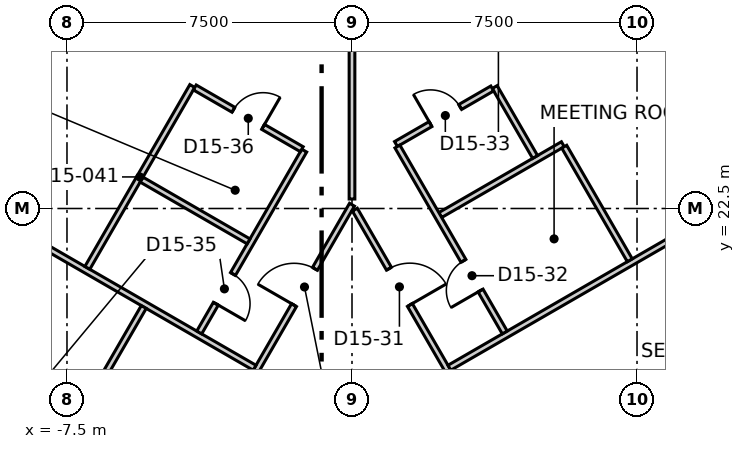
"""IFC4 building model, lengths in metres.
Left out: names, types, materials, properties, quantities, classifications, styles, units other than length and angle.
Written with IfcOpenShell. Run it as: python <this file> out.ifc"""

import sys

from ifc_helpers import new_model, si_unit, direction, frame, frame_2d, origin, place, context, subcontext, project, spatial, rectangle, extrude, element, fill, save


model = new_model("IFC4")
c1 = context("Model", 3, precision=1e-05, world=origin(), true_north=direction((0.0, 1.0)))
c2 = subcontext(c1, "Body", "Model", "MODEL_VIEW")
j1 = project(units=[si_unit("LENGTHUNIT", "METRE"), si_unit("PLANEANGLEUNIT", "RADIAN")], contexts=[c1])
p1 = place(None, origin())
s1 = spatial("IfcSite", under=j1, at=p1, CompositionType="ELEMENT")
p2 = place(p1, origin())
s2 = spatial("IfcBuilding", under=s1, at=p2, CompositionType="ELEMENT")
p3 = place(p2, frame((0.0, 0.0, 71.3)))
s3 = spatial("IfcBuildingStorey", under=s2, at=p3, CompositionType="ELEMENT", Elevation=71.3)
p4 = place(p3, frame((-3.326, 37.084, 0.0), z_axis=(0.0, 0.0, 1.0), x_axis=(-0.500000131003, -0.86602532815, 0.0)))
e1 = element("IfcWall", 1, at=p4, inside=s3, PredefinedType="ELEMENTEDWALL", context=c2, shape_type="SweptSolid", body=[
    extrude(rectangle(XDim=60.886, YDim=0.2, at=frame_2d((30.443, 0.0))), origin(), (0.0, 0.0, 1.0), 3.7),
])
p5 = place(p4, frame((2.146, 0.0, 0.9)))
e2 = element("IfcOpeningElement", 2, at=p5, cuts=e1, PredefinedType="OPENING", context=c2, shape_type="SweptSolid", body=[
    extrude(rectangle(XDim=5.6, YDim=2.5, at=frame_2d((2.8, 1.25))), frame((0.0, 0.11, 0.0), z_axis=(0.0, -1.0, 0.0), x_axis=(1.0, 0.0, 0.0)), (0.0, 0.0, 1.0), 0.22),
])
p6 = place(p4, frame((9.434, 0.0, 0.9)))
e3 = element("IfcOpeningElement", 3, at=p6, cuts=e1, PredefinedType="OPENING", context=c2, shape_type="SweptSolid", body=[
    extrude(rectangle(XDim=5.6, YDim=2.5, at=frame_2d((2.8, 1.25))), frame((0.0, 0.11, 0.0), z_axis=(0.0, -1.0, 0.0), x_axis=(1.0, 0.0, 0.0)), (0.0, 0.0, 1.0), 0.22),
])
p7 = place(p4, frame((16.721, 0.0, 0.9)))
e4 = element("IfcOpeningElement", 4, at=p7, cuts=e1, PredefinedType="OPENING", context=c2, shape_type="SweptSolid", body=[
    extrude(rectangle(XDim=5.6, YDim=2.5, at=frame_2d((2.8, 1.25))), frame((0.0, 0.11, 0.0), z_axis=(0.0, -1.0, 0.0), x_axis=(1.0, 0.0, 0.0)), (0.0, 0.0, 1.0), 0.22),
])
p8 = place(p4, frame((24.009, 0.0, 0.9)))
e5 = element("IfcOpeningElement", 5, at=p8, cuts=e1, PredefinedType="OPENING", context=c2, shape_type="SweptSolid", body=[
    extrude(rectangle(XDim=5.6, YDim=2.5, at=frame_2d((2.8, 1.25))), frame((0.0, 0.11, 0.0), z_axis=(0.0, -1.0, 0.0), x_axis=(1.0, 0.0, 0.0)), (0.0, 0.0, 1.0), 0.22),
])
p9 = place(p4, frame((31.297, 0.0, 0.9)))
e6 = element("IfcOpeningElement", 6, at=p9, cuts=e1, PredefinedType="OPENING", context=c2, shape_type="SweptSolid", body=[
    extrude(rectangle(XDim=5.6, YDim=2.5, at=frame_2d((2.8, 1.25))), frame((0.0, 0.11, 0.0), z_axis=(0.0, -1.0, 0.0), x_axis=(1.0, 0.0, 0.0)), (0.0, 0.0, 1.0), 0.22),
])
p10 = place(p4, frame((38.584, 0.0, 0.9)))
e7 = element("IfcOpeningElement", 7, at=p10, cuts=e1, PredefinedType="OPENING", context=c2, shape_type="SweptSolid", body=[
    extrude(rectangle(XDim=5.6, YDim=2.5, at=frame_2d((2.8, 1.25))), frame((0.0, 0.11, 0.0), z_axis=(0.0, -1.0, 0.0), x_axis=(1.0, 0.0, 0.0)), (0.0, 0.0, 1.0), 0.22),
])
p11 = place(p4, frame((45.872, 0.0, 0.9)))
e8 = element("IfcOpeningElement", 8, at=p11, cuts=e1, PredefinedType="OPENING", context=c2, shape_type="SweptSolid", body=[
    extrude(rectangle(XDim=5.6, YDim=2.5, at=frame_2d((2.8, 1.25))), frame((0.0, 0.11, 0.0), z_axis=(0.0, -1.0, 0.0), x_axis=(1.0, 0.0, 0.0)), (0.0, 0.0, 1.0), 0.22),
])
p12 = place(p4, frame((53.159, 0.0, 0.9)))
e9 = element("IfcOpeningElement", 9, at=p12, cuts=e1, PredefinedType="OPENING", context=c2, shape_type="SweptSolid", body=[
    extrude(rectangle(XDim=5.6, YDim=2.5, at=frame_2d((2.8, 1.25))), frame((0.0, 0.11, 0.0), z_axis=(0.0, -1.0, 0.0), x_axis=(1.0, 0.0, 0.0)), (0.0, 0.0, 1.0), 0.22),
])
p13 = place(p3, frame((33.779, -15.662, 0.0), z_axis=(0.0, 0.0, 1.0), x_axis=(-0.500000131003, 0.86602532815, 0.0)))
e10 = element("IfcWall", 10, at=p13, inside=s3, PredefinedType="ELEMENTEDWALL", context=c2, shape_type="SweptSolid", body=[
    extrude(rectangle(XDim=60.886, YDim=0.2, at=frame_2d((30.443, 0.0))), origin(), (0.0, 0.0, 1.0), 3.7),
])
p14 = place(p13, frame((2.147, 0.0, 0.9)))
e11 = element("IfcOpeningElement", 11, at=p14, cuts=e10, PredefinedType="OPENING", context=c2, shape_type="SweptSolid", body=[
    extrude(rectangle(XDim=5.6, YDim=2.5, at=frame_2d((2.8, 1.25))), frame((0.0, 0.11, 0.0), z_axis=(0.0, -1.0, 0.0), x_axis=(1.0, 0.0, 0.0)), (0.0, 0.0, 1.0), 0.22),
])
p15 = place(p13, frame((9.434, 0.0, 0.9)))
e12 = element("IfcOpeningElement", 12, at=p15, cuts=e10, PredefinedType="OPENING", context=c2, shape_type="SweptSolid", body=[
    extrude(rectangle(XDim=5.6, YDim=2.5, at=frame_2d((2.8, 1.25))), frame((0.0, 0.11, 0.0), z_axis=(0.0, -1.0, 0.0), x_axis=(1.0, 0.0, 0.0)), (0.0, 0.0, 1.0), 0.22),
])
p16 = place(p13, frame((16.722, 0.0, 0.9)))
e13 = element("IfcOpeningElement", 13, at=p16, cuts=e10, PredefinedType="OPENING", context=c2, shape_type="SweptSolid", body=[
    extrude(rectangle(XDim=5.6, YDim=2.5, at=frame_2d((2.8, 1.25))), frame((0.0, 0.11, 0.0), z_axis=(0.0, -1.0, 0.0), x_axis=(1.0, 0.0, 0.0)), (0.0, 0.0, 1.0), 0.22),
])
p17 = place(p13, frame((24.009, 0.0, 0.9)))
e14 = element("IfcOpeningElement", 14, at=p17, cuts=e10, PredefinedType="OPENING", context=c2, shape_type="SweptSolid", body=[
    extrude(rectangle(XDim=5.6, YDim=2.5, at=frame_2d((2.8, 1.25))), frame((0.0, 0.11, 0.0), z_axis=(0.0, -1.0, 0.0), x_axis=(1.0, 0.0, 0.0)), (0.0, 0.0, 1.0), 0.22),
])
p18 = place(p13, frame((31.297, 0.0, 0.9)))
e15 = element("IfcOpeningElement", 15, at=p18, cuts=e10, PredefinedType="OPENING", context=c2, shape_type="SweptSolid", body=[
    extrude(rectangle(XDim=5.6, YDim=2.5, at=frame_2d((2.8, 1.25))), frame((0.0, 0.11, 0.0), z_axis=(0.0, -1.0, 0.0), x_axis=(1.0, 0.0, 0.0)), (0.0, 0.0, 1.0), 0.22),
])
p19 = place(p13, frame((38.584, 0.0, 0.9)))
e16 = element("IfcOpeningElement", 16, at=p19, cuts=e10, PredefinedType="OPENING", context=c2, shape_type="SweptSolid", body=[
    extrude(rectangle(XDim=5.6, YDim=2.5, at=frame_2d((2.8, 1.25))), frame((0.0, 0.11, 0.0), z_axis=(0.0, -1.0, 0.0), x_axis=(1.0, 0.0, 0.0)), (0.0, 0.0, 1.0), 0.22),
])
p20 = place(p13, frame((45.872, 0.0, 0.9)))
e17 = element("IfcOpeningElement", 17, at=p20, cuts=e10, PredefinedType="OPENING", context=c2, shape_type="SweptSolid", body=[
    extrude(rectangle(XDim=5.6, YDim=2.5, at=frame_2d((2.8, 1.25))), frame((0.0, 0.11, 0.0), z_axis=(0.0, -1.0, 0.0), x_axis=(1.0, 0.0, 0.0)), (0.0, 0.0, 1.0), 0.22),
])
p21 = place(p13, frame((53.16, 0.0, 0.9)))
e18 = element("IfcOpeningElement", 18, at=p21, cuts=e10, PredefinedType="OPENING", context=c2, shape_type="SweptSolid", body=[
    extrude(rectangle(XDim=5.6, YDim=2.5, at=frame_2d((2.8, 1.25))), frame((0.0, 0.11, 0.0), z_axis=(0.0, -1.0, 0.0), x_axis=(1.0, 0.0, 0.0)), (0.0, 0.0, 1.0), 0.22),
])
p22 = place(p3, frame((-19.497, -11.17, 0.0), z_axis=(0.0, 0.0, 1.0), x_axis=(0.499998854553, 0.866026065108, 0.0)))
e19 = element("IfcWall", 19, at=p22, inside=s3, PredefinedType="PARTITIONING", context=c2, shape_type="SweptSolid", body=[
    extrude(rectangle(XDim=38.994, YDim=0.15, at=frame_2d((19.497, 0.0))), origin(), (0.0, 0.0, 1.0), 3.7),
])
p23 = place(p22, frame((35.944, 0.0, 0.0)))
e20 = element("IfcOpeningElement", 20, at=p23, cuts=e19, PredefinedType="OPENING", context=c2, shape_type="SweptSolid", body=[
    extrude(rectangle(XDim=1.1, YDim=2.1, at=frame_2d((0.55, 1.05))), frame((0.0, 0.085, 0.0), z_axis=(0.0, -1.0, 0.0), x_axis=(1.0, 0.0, 0.0)), (0.0, 0.0, 1.0), 0.17),
])
p24 = place(p22, frame((26.148, 0.0, 0.0)))
e21 = element("IfcOpeningElement", 21, at=p24, cuts=e19, PredefinedType="OPENING", context=c2, shape_type="SweptSolid", body=[
    extrude(rectangle(XDim=1.1, YDim=2.1, at=frame_2d((0.55, 1.05))), frame((0.0, 0.085, 0.0), z_axis=(0.0, -1.0, 0.0), x_axis=(1.0, 0.0, 0.0)), (0.0, 0.0, 1.0), 0.17),
])
p25 = place(p22, frame((8.572, 0.0, 0.0)))
e22 = element("IfcOpeningElement", 22, at=p25, cuts=e19, PredefinedType="OPENING", context=c2, shape_type="SweptSolid", body=[
    extrude(rectangle(XDim=1.1, YDim=2.1, at=frame_2d((0.55, 1.05))), frame((0.0, 0.085, 0.0), z_axis=(0.0, -1.0, 0.0), x_axis=(1.0, 0.0, 0.0)), (0.0, 0.0, 1.0), 0.17),
])
p26 = place(p22, frame((17.172, 0.0, 0.0)))
e23 = element("IfcOpeningElement", 23, at=p26, cuts=e19, PredefinedType="OPENING", context=c2, shape_type="SweptSolid", body=[
    extrude(rectangle(XDim=0.9, YDim=2.1, at=frame_2d((0.45, 1.05))), frame((0.0, 0.085, 0.0), z_axis=(0.0, -1.0, 0.0), x_axis=(1.0, 0.0, 0.0)), (0.0, 0.0, 1.0), 0.17),
])
p27 = place(p22, frame((14.172, 0.0, 0.0)))
e24 = element("IfcOpeningElement", 24, at=p27, cuts=e19, PredefinedType="OPENING", context=c2, shape_type="SweptSolid", body=[
    extrude(rectangle(XDim=0.9, YDim=2.1, at=frame_2d((0.45, 1.05))), frame((0.0, 0.085, 0.0), z_axis=(0.0, -1.0, 0.0), x_axis=(1.0, 0.0, 0.0)), (0.0, 0.0, 1.0), 0.17),
])
p28 = place(p22, frame((1.797, 0.0, 0.0)))
e25 = element("IfcOpeningElement", 25, at=p28, cuts=e19, PredefinedType="OPENING", context=c2, shape_type="SweptSolid", body=[
    extrude(rectangle(XDim=1.1, YDim=2.1, at=frame_2d((0.55, 1.05))), frame((0.0, 0.085, 0.0), z_axis=(0.0, -1.0, 0.0), x_axis=(1.0, 0.0, 0.0)), (0.0, 0.0, 1.0), 0.17),
])
p29 = place(p3, frame((-11.195, 23.294, 0.0), z_axis=(0.0, 0.0, 1.0), x_axis=(0.866018758693, -0.500011509459, 0.0)))
e26 = element("IfcWall", 26, at=p29, inside=s3, PredefinedType="PARTITIONING", context=c2, shape_type="SweptSolid", body=[
    extrude(rectangle(XDim=9.968, YDim=0.15, at=frame_2d((4.984, 0.0))), origin(), (0.0, 0.0, 1.0), 3.7),
])
p30 = place(p3, frame((0.0, 22.75, 0.0), z_axis=(0.0, 0.0, 1.0), x_axis=(0.0, 1.0, 0.0)))
e27 = element("IfcWall", 27, at=p30, inside=s3, PredefinedType="PARTITIONING", context=c2, shape_type="SweptSolid", body=[
    extrude(rectangle(XDim=7.638, YDim=0.15, at=frame_2d((3.819, 0.0))), origin(), (0.0, 0.0, 1.0), 3.1),
])
p31 = place(p3, frame((0.075, 22.47, 0.0), z_axis=(0.0, 0.0, 1.0), x_axis=(0.500002280369, -0.866024087209, 0.0)))
e28 = element("IfcWall", 28, at=p31, inside=s3, PredefinedType="PARTITIONING", context=c2, shape_type="SweptSolid", body=[
    extrude(rectangle(XDim=38.844, YDim=0.15, at=frame_2d((19.422, 0.0))), origin(), (0.0, 0.0, 1.0), 3.7),
])
p32 = place(p31, frame((35.944, 0.0, 0.0)))
e29 = element("IfcOpeningElement", 29, at=p32, cuts=e28, PredefinedType="OPENING", context=c2, shape_type="SweptSolid", body=[
    extrude(rectangle(XDim=1.1, YDim=2.1, at=frame_2d((0.55, 1.05))), frame((0.0, 0.085, 0.0), z_axis=(0.0, -1.0, 0.0), x_axis=(1.0, 0.0, 0.0)), (0.0, 0.0, 1.0), 0.17),
])
p33 = place(p31, frame((29.848, 0.0, 0.0)))
e30 = element("IfcOpeningElement", 30, at=p33, cuts=e28, PredefinedType="OPENING", context=c2, shape_type="SweptSolid", body=[
    extrude(rectangle(XDim=1.0, YDim=2.1, at=frame_2d((0.5, 1.05))), frame((0.0, 0.085, 0.0), z_axis=(0.0, -1.0, 0.0), x_axis=(1.0, 0.0, 0.0)), (0.0, 0.0, 1.0), 0.17),
])
p34 = place(p31, frame((14.46, 0.0, 0.0)))
e31 = element("IfcOpeningElement", 31, at=p34, cuts=e28, PredefinedType="OPENING", context=c2, shape_type="SweptSolid", body=[
    extrude(rectangle(XDim=1.1, YDim=2.1, at=frame_2d((0.55, 1.05))), frame((0.0, 0.085, 0.0), z_axis=(0.0, -1.0, 0.0), x_axis=(1.0, 0.0, 0.0)), (0.0, 0.0, 1.0), 0.17),
])
p35 = place(p31, frame((24.66, 0.0, 0.0)))
e32 = element("IfcOpeningElement", 32, at=p35, cuts=e28, PredefinedType="OPENING", context=c2, shape_type="SweptSolid", body=[
    extrude(rectangle(XDim=0.9, YDim=2.1, at=frame_2d((0.45, 1.05))), frame((0.0, 0.085, 0.0), z_axis=(0.0, -1.0, 0.0), x_axis=(1.0, 0.0, 0.0)), (0.0, 0.0, 1.0), 0.17),
])
p36 = place(p31, frame((21.46, 0.0, 0.0)))
e33 = element("IfcOpeningElement", 33, at=p36, cuts=e28, PredefinedType="OPENING", context=c2, shape_type="SweptSolid", body=[
    extrude(rectangle(XDim=0.9, YDim=2.1, at=frame_2d((0.45, 1.05))), frame((0.0, 0.085, 0.0), z_axis=(0.0, -1.0, 0.0), x_axis=(1.0, 0.0, 0.0)), (0.0, 0.0, 1.0), 0.17),
])
p37 = place(p31, frame((18.66, 0.0, 0.0)))
e34 = element("IfcOpeningElement", 34, at=p37, cuts=e28, PredefinedType="OPENING", context=c2, shape_type="SweptSolid", body=[
    extrude(rectangle(XDim=1.0, YDim=2.1, at=frame_2d((0.5, 1.05))), frame((0.0, 0.085, 0.0), z_axis=(0.0, -1.0, 0.0), x_axis=(1.0, 0.0, 0.0)), (0.0, 0.0, 1.0), 0.17),
])
p38 = place(p31, frame((6.785, 0.0, 0.0)))
e35 = element("IfcOpeningElement", 35, at=p38, cuts=e28, PredefinedType="OPENING", context=c2, shape_type="SweptSolid", body=[
    extrude(rectangle(XDim=1.0, YDim=2.1, at=frame_2d((0.5, 1.05))), frame((0.0, 0.085, 0.0), z_axis=(0.0, -1.0, 0.0), x_axis=(1.0, 0.0, 0.0)), (0.0, 0.0, 1.0), 0.17),
])
p39 = place(p31, frame((10.485, 0.0, 0.0)))
e36 = element("IfcOpeningElement", 36, at=p39, cuts=e28, PredefinedType="OPENING", context=c2, shape_type="SweptSolid", body=[
    extrude(rectangle(XDim=0.9, YDim=2.1, at=frame_2d((0.45, 1.05))), frame((0.0, 0.085, 0.0), z_axis=(0.0, -1.0, 0.0), x_axis=(1.0, 0.0, 0.0)), (0.0, 0.0, 1.0), 0.17),
])
p40 = place(p31, frame((1.796, 0.0, 0.0)))
e37 = element("IfcOpeningElement", 37, at=p40, cuts=e28, PredefinedType="OPENING", context=c2, shape_type="SweptSolid", body=[
    extrude(rectangle(XDim=1.1, YDim=2.1, at=frame_2d((0.55, 1.05))), frame((0.0, 0.085, 0.0), z_axis=(0.0, -1.0, 0.0), x_axis=(1.0, 0.0, 0.0)), (0.0, 0.0, 1.0), 0.17),
])
p41 = place(p3, frame((2.563, 18.31, 0.0), z_axis=(0.0, 0.0, 1.0), x_axis=(0.866018758693, 0.500011509459, 0.0)))
e38 = element("IfcWall", 38, at=p41, inside=s3, PredefinedType="PARTITIONING", context=c2, shape_type="SweptSolid", body=[
    extrude(rectangle(XDim=9.968, YDim=0.15, at=frame_2d((4.984, 0.0))), origin(), (0.0, 0.0, 1.0), 3.7),
])
p42 = place(p3, frame((-12.693, 7.415, 0.0), z_axis=(0.0, 0.0, 1.0), x_axis=(0.500017889033, 0.8660150753, 0.0)))
e39 = element("IfcWall", 39, at=p42, inside=s3, PredefinedType="PARTITIONING", context=c2, shape_type="SweptSolid", body=[
    extrude(rectangle(XDim=14.426, YDim=0.15, at=frame_2d((7.213, 0.0))), origin(), (0.0, 0.0, 1.0), 3.7),
])
p43 = place(p42, frame((6.751, 0.0, 0.0)))
e40 = element("IfcOpeningElement", 40, at=p43, cuts=e39, PredefinedType="OPENING", context=c2, shape_type="SweptSolid", body=[
    extrude(rectangle(XDim=1.0, YDim=2.1, at=frame_2d((0.5, 1.05))), frame((0.0, 0.085, 0.0), z_axis=(0.0, -1.0, 0.0), x_axis=(1.0, 0.0, 0.0)), (0.0, 0.0, 1.0), 0.17),
])
p44 = place(p3, frame((-6.964, 20.938, 0.0), z_axis=(0.0, 0.0, 1.0), x_axis=(0.499950687084, 0.866053872738, 0.0)))
e41 = element("IfcWall", 41, at=p44, inside=s3, PredefinedType="PARTITIONING", context=c2, shape_type="SweptSolid", body=[
    extrude(rectangle(XDim=5.525, YDim=0.15, at=frame_2d((2.762, 0.0))), origin(), (0.0, 0.0, 1.0), 3.7),
])
p45 = place(p3, frame((-4.02, 19.238, 0.0), z_axis=(0.0, 0.0, 1.0), x_axis=(0.500050108258, 0.865996471835, 0.0)))
e42 = element("IfcWall", 42, at=p45, inside=s3, PredefinedType="PARTITIONING", context=c2, shape_type="SweptSolid", body=[
    extrude(rectangle(XDim=5.525, YDim=0.15, at=frame_2d((2.763, 0.0))), origin(), (0.0, 0.0, 1.0), 3.7),
])
p46 = place(p45, frame((0.875, 0.0, 0.0)))
e43 = element("IfcOpeningElement", 43, at=p46, cuts=e42, PredefinedType="OPENING", context=c2, shape_type="SweptSolid", body=[
    extrude(rectangle(XDim=0.9, YDim=2.1, at=frame_2d((0.45, 1.05))), frame((0.0, 0.085, 0.0), z_axis=(0.0, -1.0, 0.0), x_axis=(1.0, 0.0, 0.0)), (0.0, 0.0, 1.0), 0.17),
])
p47 = place(p3, frame((-4.137, 25.685, 0.0), z_axis=(0.0, 0.0, 1.0), x_axis=(0.866053003207, -0.499952193351, 0.0)))
e44 = element("IfcWall", 44, at=p47, inside=s3, PredefinedType="PARTITIONING", context=c2, shape_type="SweptSolid", body=[
    extrude(rectangle(XDim=3.25, YDim=0.15, at=frame_2d((1.625, 0.0))), origin(), (0.0, 0.0, 1.0), 3.7),
])
p48 = place(p47, frame((1.175, 0.0, 0.0)))
e45 = element("IfcOpeningElement", 45, at=p48, cuts=e44, PredefinedType="OPENING", context=c2, shape_type="SweptSolid", body=[
    extrude(rectangle(XDim=0.9, YDim=2.1, at=frame_2d((0.45, 1.05))), frame((0.0, 0.085, 0.0), z_axis=(0.0, -1.0, 0.0), x_axis=(1.0, 0.0, 0.0)), (0.0, 0.0, 1.0), 0.17),
])
p49 = place(p3, frame((-5.537, 23.26, 0.0), z_axis=(0.0, 0.0, 1.0), x_axis=(0.866071776036, -0.499919672301, 0.0)))
e46 = element("IfcWall", 46, at=p49, inside=s3, PredefinedType="PARTITIONING", context=c2, shape_type="SweptSolid", body=[
    extrude(rectangle(XDim=3.25, YDim=0.15, at=frame_2d((1.625, 0.0))), origin(), (0.0, 0.0, 1.0), 3.7),
])
p50 = place(p3, frame((2.322, 22.328, 0.0), z_axis=(0.0, 0.0, 1.0), x_axis=(0.865971665278, 0.500093066274, 0.0)))
e47 = element("IfcWall", 47, at=p50, inside=s3, PredefinedType="PARTITIONING", context=c2, shape_type="SweptSolid", body=[
    extrude(rectangle(XDim=3.725, YDim=0.15, at=frame_2d((1.863, 0.0))), origin(), (0.0, 0.0, 1.0), 3.7),
])
p51 = place(p3, frame((3.755, 25.696, 0.0), z_axis=(0.0, 0.0, 1.0), x_axis=(0.500302479123, -0.865850696935, 0.0)))
e48 = element("IfcWall", 48, at=p51, inside=s3, PredefinedType="PARTITIONING", context=c2, shape_type="SweptSolid", body=[
    extrude(rectangle(XDim=2.125, YDim=0.15, at=frame_2d((1.062, 0.0))), origin(), (0.0, 0.0, 1.0), 3.7),
])
p52 = place(p3, frame((1.157, 24.196, 0.0), z_axis=(0.0, 0.0, 1.0), x_axis=(0.866098016745, 0.499874209568, 0.0)))
e49 = element("IfcWall", 49, at=p52, inside=s3, PredefinedType="PARTITIONING", context=c2, shape_type="SweptSolid", body=[
    extrude(rectangle(XDim=2.925, YDim=0.15, at=frame_2d((1.462, 0.0))), origin(), (0.0, 0.0, 1.0), 3.7),
])
p53 = place(p52, frame((1.05, 0.0, 0.0)))
e50 = element("IfcOpeningElement", 50, at=p53, cuts=e49, PredefinedType="OPENING", context=c2, shape_type="SweptSolid", body=[
    extrude(rectangle(XDim=0.9, YDim=2.1, at=frame_2d((0.45, 1.05))), frame((0.0, 0.085, 0.0), z_axis=(0.0, -1.0, 0.0), x_axis=(1.0, 0.0, 0.0)), (0.0, 0.0, 1.0), 0.17),
])
p54 = place(p3, frame((1.195, 24.131, 0.0), z_axis=(0.0, 0.0, 1.0), x_axis=(0.499991765245, -0.86603015807, 0.0)))
e51 = element("IfcWall", 51, at=p54, inside=s3, PredefinedType="PARTITIONING", context=c2, shape_type="SweptSolid", body=[
    extrude(rectangle(XDim=5.65, YDim=0.15, at=frame_2d((2.825, 0.0))), origin(), (0.0, 0.0, 1.0), 3.7),
])
p55 = place(p54, frame((3.475, 0.0, 0.0)))
e52 = element("IfcOpeningElement", 52, at=p55, cuts=e51, PredefinedType="OPENING", context=c2, shape_type="SweptSolid", body=[
    extrude(rectangle(XDim=0.9, YDim=2.1, at=frame_2d((0.45, 1.05))), frame((0.0, 0.085, 0.0), z_axis=(0.0, -1.0, 0.0), x_axis=(1.0, 0.0, 0.0)), (0.0, 0.0, 1.0), 0.17),
])
p56 = place(p3, frame((5.585, 24.126, 0.0), z_axis=(0.0, 0.0, 1.0), x_axis=(0.49998991961, -0.866031223622, 0.0)))
e53 = element("IfcWall", 53, at=p56, inside=s3, PredefinedType="PARTITIONING", context=c2, shape_type="SweptSolid", body=[
    extrude(rectangle(XDim=3.45, YDim=0.15, at=frame_2d((1.725, 0.0))), origin(), (0.0, 0.0, 1.0), 3.7),
])
p57 = place(p20, origin())
e54 = element("IfcWindow", 54, at=p57, inside=s3, PartitioningType="SINGLE_PANEL", PredefinedType="WINDOW", context=c2, shape_type="SweptSolid", body=[
    extrude(rectangle(XDim=5.6, YDim=2.5, at=frame_2d((2.8, 1.25))), frame((0.0, 0.03, 0.0), z_axis=(0.0, -1.0, 0.0), x_axis=(1.0, 0.0, 0.0)), (0.0, 0.0, 1.0), 0.06),
])
fill(e17, e54)
p58 = place(p40, origin())
e55 = element("IfcDoor", 55, at=p58, inside=s3, OperationType="SINGLE_SWING_LEFT", PredefinedType="DOOR", context=c2, shape_type="SweptSolid", body=[
    extrude(rectangle(XDim=1.1, YDim=2.1, at=frame_2d((0.55, 1.05))), frame((0.0, 0.025, 0.0), z_axis=(0.0, -1.0, 0.0), x_axis=(1.0, 0.0, 0.0)), (0.0, 0.0, 1.0), 0.05),
])
fill(e37, e55)
p59 = place(p55, origin())
e56 = element("IfcDoor", 56, at=p59, inside=s3, OperationType="SINGLE_SWING_RIGHT", PredefinedType="DOOR", context=c2, shape_type="SweptSolid", body=[
    extrude(rectangle(XDim=0.9, YDim=2.1, at=frame_2d((0.45, 1.05))), frame((0.0, 0.025, 0.0), z_axis=(0.0, -1.0, 0.0), x_axis=(1.0, 0.0, 0.0)), (0.0, 0.0, 1.0), 0.05),
])
fill(e52, e56)
p60 = place(p53, origin())
e57 = element("IfcDoor", 57, at=p60, inside=s3, OperationType="SINGLE_SWING_RIGHT", PredefinedType="DOOR", context=c2, shape_type="SweptSolid", body=[
    extrude(rectangle(XDim=0.9, YDim=2.1, at=frame_2d((0.45, 1.05))), frame((0.0, 0.025, 0.0), z_axis=(0.0, -1.0, 0.0), x_axis=(1.0, 0.0, 0.0)), (0.0, 0.0, 1.0), 0.05),
])
fill(e50, e57)
p61 = place(p23, origin())
e58 = element("IfcDoor", 58, at=p61, inside=s3, OperationType="SINGLE_SWING_RIGHT", PredefinedType="DOOR", context=c2, shape_type="SweptSolid", body=[
    extrude(rectangle(XDim=1.1, YDim=2.1, at=frame_2d((0.55, 1.05))), frame((0.0, 0.025, 0.0), z_axis=(0.0, -1.0, 0.0), x_axis=(1.0, 0.0, 0.0)), (0.0, 0.0, 1.0), 0.05),
])
fill(e20, e58)
p62 = place(p46, origin())
e59 = element("IfcDoor", 59, at=p62, inside=s3, OperationType="SINGLE_SWING_LEFT", PredefinedType="DOOR", context=c2, shape_type="SweptSolid", body=[
    extrude(rectangle(XDim=0.9, YDim=2.1, at=frame_2d((0.45, 1.05))), frame((0.0, 0.025, 0.0), z_axis=(0.0, -1.0, 0.0), x_axis=(1.0, 0.0, 0.0)), (0.0, 0.0, 1.0), 0.05),
])
fill(e43, e59)
p63 = place(p48, origin())
e60 = element("IfcDoor", 60, at=p63, inside=s3, OperationType="SINGLE_SWING_LEFT", PredefinedType="DOOR", context=c2, shape_type="SweptSolid", body=[
    extrude(rectangle(XDim=0.9, YDim=2.1, at=frame_2d((0.45, 1.05))), frame((0.0, 0.025, 0.0), z_axis=(0.0, -1.0, 0.0), x_axis=(1.0, 0.0, 0.0)), (0.0, 0.0, 1.0), 0.05),
])
fill(e45, e60)
save(model, sys.argv[1])
